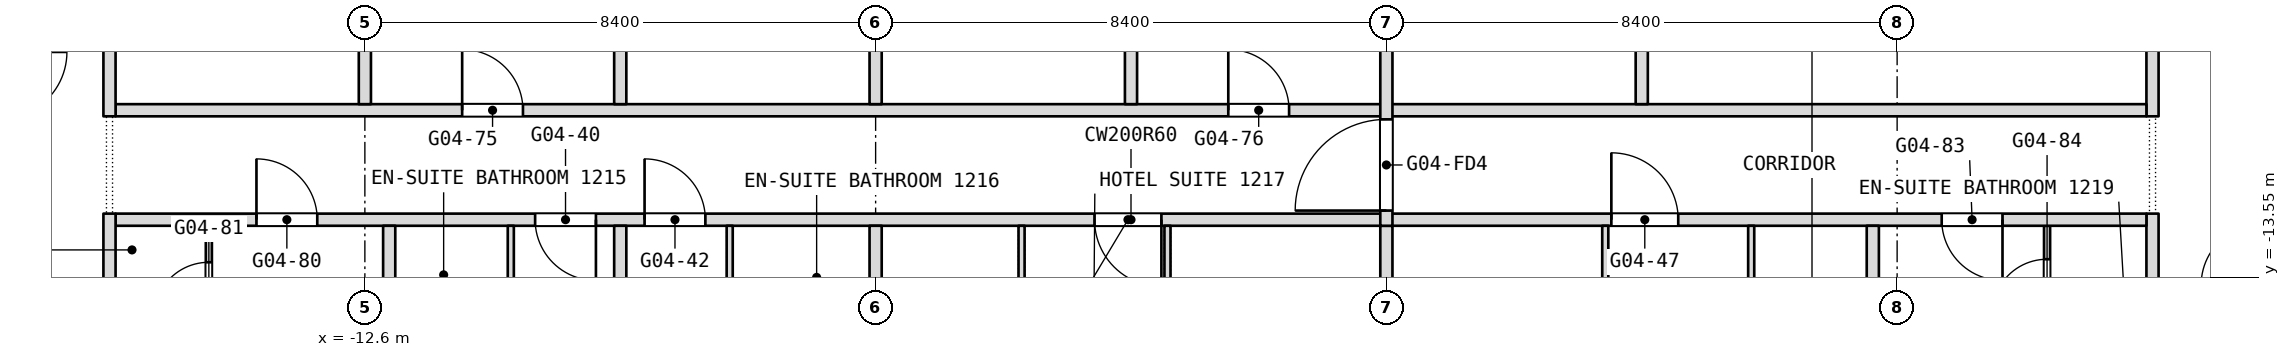
"""IFC4 building model, lengths in metres.
Left out: names, types, materials, properties, quantities, classifications, styles, units other than length and angle.
Written with IfcOpenShell. Run it as: python <this file> out.ifc"""

import sys

from ifc_helpers import new_model, si_unit, direction, frame, frame_2d, origin, place, context, subcontext, project, spatial, rectangle, extrude, element, fill, save


model = new_model("IFC4")
c1 = context("Model", 3, precision=1e-05, world=origin(), true_north=direction((0.0, 1.0)))
c2 = subcontext(c1, "Body", "Model", "MODEL_VIEW")
j1 = project(units=[si_unit("LENGTHUNIT", "METRE"), si_unit("PLANEANGLEUNIT", "RADIAN")], contexts=[c1])
p1 = place(None, origin())
s1 = spatial("IfcSite", under=j1, at=p1, CompositionType="ELEMENT")
p2 = place(p1, origin())
s2 = spatial("IfcBuilding", under=s1, at=p2, CompositionType="ELEMENT")
p3 = place(p2, frame((0.0, 0.0, 58.1)))
s3 = spatial("IfcBuildingStorey", under=s2, at=p3, CompositionType="ELEMENT", Elevation=58.1)
p4 = place(p3, frame((16.8, -17.143, 0.0), z_axis=(0.0, 0.0, 1.0), x_axis=(0.0, 1.0, 0.0)))
e1 = element("IfcWall", 1, at=p4, inside=s3, PredefinedType="PARTITIONING", context=c2, shape_type="SweptSolid", body=[
    extrude(rectangle(XDim=4.643, YDim=0.2, at=frame_2d((2.322, 0.0))), origin(), (0.0, 0.0, 1.0), 3.34),
])
p5 = place(p4, frame((0.771, 0.0, 0.0)))
e2 = element("IfcOpeningElement", 2, at=p5, cuts=e1, PredefinedType="OPENING", context=c2, shape_type="SweptSolid", body=[
    extrude(rectangle(XDim=0.9, YDim=2.1, at=frame_2d((0.45, 1.05))), frame((0.0, 0.1, 0.0), z_axis=(0.0, -1.0, 0.0), x_axis=(1.0, 0.0, 0.0)), (0.0, 0.0, 1.0), 0.2),
])
p6 = place(p3, frame((16.8, -10.9, 0.0), z_axis=(0.0, 0.0, 1.0), x_axis=(0.0, 1.0, 0.0)))
e3 = element("IfcWall", 3, at=p6, inside=s3, PredefinedType="PARTITIONING", context=c2, shape_type="SweptSolid", body=[
    extrude(rectangle(XDim=7.3, YDim=0.2, at=frame_2d((3.65, 0.0))), origin(), (0.0, 0.0, 1.0), 3.34),
])
p7 = place(p6, frame((3.15, 0.0, 0.0)))
e4 = element("IfcOpeningElement", 4, at=p7, cuts=e3, PredefinedType="OPENING", context=c2, shape_type="SweptSolid", body=[
    extrude(rectangle(XDim=1.0, YDim=2.1, at=frame_2d((0.5, 1.05))), frame((0.0, 0.1, 0.0), z_axis=(0.0, -1.0, 0.0), x_axis=(1.0, 0.0, 0.0)), (0.0, 0.0, 1.0), 0.2),
])
p8 = place(p3, frame((15.066, -14.9, 0.0), z_axis=(0.0, 0.0, 1.0), x_axis=(0.0, 1.0, 0.0)))
e5 = element("IfcWall", 5, at=p8, inside=s3, PredefinedType="PARTITIONING", context=c2, shape_type="SweptSolid", body=[
    extrude(rectangle(XDim=2.2, YDim=0.1, at=frame_2d((1.1, 0.0))), origin(), (0.0, 0.0, 1.0), 3.34),
])
p9 = place(p8, frame((0.75, 0.0, 0.0)))
e6 = element("IfcOpeningElement", 6, at=p9, cuts=e5, PredefinedType="OPENING", context=c2, shape_type="SweptSolid", body=[
    extrude(rectangle(XDim=0.9, YDim=2.1, at=frame_2d((0.45, 1.05))), frame((0.0, 0.05, 0.0), z_axis=(0.0, -1.0, 0.0), x_axis=(1.0, 0.0, 0.0)), (0.0, 0.0, 1.0), 0.1),
])
p10 = place(p3, frame((-16.7, -12.6, 0.0), z_axis=(0.0, 0.0, 1.0), x_axis=(1.0, 0.0, 0.0)))
e7 = element("IfcWall", 7, at=p10, inside=s3, PredefinedType="PARTITIONING", context=c2, shape_type="SweptSolid", body=[
    extrude(rectangle(XDim=33.4, YDim=0.2, at=frame_2d((16.7, 0.0))), origin(), (0.0, 0.0, 1.0), 3.34),
])
p11 = place(p10, frame((6.9, 0.0, 0.0)))
e8 = element("IfcOpeningElement", 8, at=p11, cuts=e7, PredefinedType="OPENING", context=c2, shape_type="SweptSolid", body=[
    extrude(rectangle(XDim=1.0, YDim=2.1, at=frame_2d((0.5, 1.05))), frame((0.0, 0.1, 0.0), z_axis=(0.0, -1.0, 0.0), x_axis=(1.0, 0.0, 0.0)), (0.0, 0.0, 1.0), 0.2),
])
p12 = place(p10, frame((8.7, 0.0, 0.0)))
e9 = element("IfcOpeningElement", 9, at=p12, cuts=e7, PredefinedType="OPENING", context=c2, shape_type="SweptSolid", body=[
    extrude(rectangle(XDim=1.0, YDim=2.1, at=frame_2d((0.5, 1.05))), frame((0.0, 0.1, 0.0), z_axis=(0.0, -1.0, 0.0), x_axis=(1.0, 0.0, 0.0)), (0.0, 0.0, 1.0), 0.2),
])
p13 = place(p10, frame((16.1, 0.0, 0.0)))
e10 = element("IfcOpeningElement", 10, at=p13, cuts=e7, PredefinedType="OPENING", context=c2, shape_type="SweptSolid", body=[
    extrude(rectangle(XDim=1.1, YDim=2.1, at=frame_2d((0.55, 1.05))), frame((0.0, 0.1, 0.0), z_axis=(0.0, -1.0, 0.0), x_axis=(1.0, 0.0, 0.0)), (0.0, 0.0, 1.0), 0.2),
])
p14 = place(p10, frame((24.6, 0.0, 0.0)))
e11 = element("IfcOpeningElement", 11, at=p14, cuts=e7, PredefinedType="OPENING", context=c2, shape_type="SweptSolid", body=[
    extrude(rectangle(XDim=1.1, YDim=2.1, at=frame_2d((0.55, 1.05))), frame((0.0, 0.1, 0.0), z_axis=(0.0, -1.0, 0.0), x_axis=(1.0, 0.0, 0.0)), (0.0, 0.0, 1.0), 0.2),
])
p15 = place(p10, frame((2.317, 0.0, 0.0)))
e12 = element("IfcOpeningElement", 12, at=p15, cuts=e7, PredefinedType="OPENING", context=c2, shape_type="SweptSolid", body=[
    extrude(rectangle(XDim=1.0, YDim=2.1, at=frame_2d((0.5, 1.05))), frame((0.0, 0.1, 0.0), z_axis=(0.0, -1.0, 0.0), x_axis=(1.0, 0.0, 0.0)), (0.0, 0.0, 1.0), 0.2),
])
p16 = place(p10, frame((30.033, 0.0, 0.0)))
e13 = element("IfcOpeningElement", 13, at=p16, cuts=e7, PredefinedType="OPENING", context=c2, shape_type="SweptSolid", body=[
    extrude(rectangle(XDim=1.0, YDim=2.1, at=frame_2d((0.5, 1.05))), frame((0.0, 0.1, 0.0), z_axis=(0.0, -1.0, 0.0), x_axis=(1.0, 0.0, 0.0)), (0.0, 0.0, 1.0), 0.2),
])
p17 = place(p3, frame((12.2, -15.8, 0.0), z_axis=(0.0, 0.0, 1.0), x_axis=(0.0, 1.0, 0.0)))
e14 = element("IfcWall", 14, at=p17, inside=s3, PredefinedType="PARTITIONING", context=c2, shape_type="SweptSolid", body=[
    extrude(rectangle(XDim=3.1, YDim=0.2, at=frame_2d((1.55, 0.0))), origin(), (0.0, 0.0, 1.0), 3.34),
])
p18 = place(p3, frame((-16.7, -10.8, 0.0), z_axis=(0.0, 0.0, 1.0), x_axis=(1.0, 0.0, 0.0)))
e15 = element("IfcWall", 15, at=p18, inside=s3, PredefinedType="PARTITIONING", context=c2, shape_type="SweptSolid", body=[
    extrude(rectangle(XDim=33.4, YDim=0.2, at=frame_2d((16.7, 0.0))), origin(), (0.0, 0.0, 1.0), 3.34),
])
p19 = place(p18, frame((5.7, 0.0, 0.0)))
e16 = element("IfcOpeningElement", 16, at=p19, cuts=e15, PredefinedType="OPENING", context=c2, shape_type="SweptSolid", body=[
    extrude(rectangle(XDim=1.0, YDim=2.1, at=frame_2d((0.5, 1.05))), frame((0.0, 0.1, 0.0), z_axis=(0.0, -1.0, 0.0), x_axis=(1.0, 0.0, 0.0)), (0.0, 0.0, 1.0), 0.2),
])
p20 = place(p18, frame((18.3, 0.0, 0.0)))
e17 = element("IfcOpeningElement", 17, at=p20, cuts=e15, PredefinedType="OPENING", context=c2, shape_type="SweptSolid", body=[
    extrude(rectangle(XDim=1.0, YDim=2.1, at=frame_2d((0.5, 1.05))), frame((0.0, 0.1, 0.0), z_axis=(0.0, -1.0, 0.0), x_axis=(1.0, 0.0, 0.0)), (0.0, 0.0, 1.0), 0.2),
])
p21 = place(p3, frame((10.2, -16.25, 0.0), z_axis=(0.0, 0.0, 1.0), x_axis=(0.0, 1.0, 0.0)))
e18 = element("IfcWall", 18, at=p21, inside=s3, PredefinedType="PARTITIONING", context=c2, shape_type="SweptSolid", body=[
    extrude(rectangle(XDim=3.55, YDim=0.1, at=frame_2d((1.775, 0.0))), origin(), (0.0, 0.0, 1.0), 3.34),
])
p22 = place(p3, frame((8.4, -10.7, 0.0), z_axis=(0.0, 0.0, 1.0), x_axis=(0.0, 1.0, 0.0)))
e19 = element("IfcWall", 19, at=p22, inside=s3, PredefinedType="PARTITIONING", context=c2, shape_type="SweptSolid", body=[
    extrude(rectangle(XDim=3.6, YDim=0.2, at=frame_2d((1.8, 0.0))), origin(), (0.0, 0.0, 1.0), 3.34),
])
p23 = place(p3, frame((7.8, -16.15, 0.0), z_axis=(0.0, 0.0, 1.0), x_axis=(0.0, 1.0, 0.0)))
e20 = element("IfcWall", 20, at=p23, inside=s3, PredefinedType="PARTITIONING", context=c2, shape_type="SweptSolid", body=[
    extrude(rectangle(XDim=3.45, YDim=0.1, at=frame_2d((1.725, 0.0))), origin(), (0.0, 0.0, 1.0), 3.34),
])
p24 = place(p3, frame((4.2, -17.7, 0.0), z_axis=(0.0, 0.0, 1.0), x_axis=(0.0, 1.0, 0.0)))
e21 = element("IfcWall", 21, at=p24, inside=s3, PredefinedType="PARTITIONING", context=c2, shape_type="SweptSolid", body=[
    extrude(rectangle(XDim=5.0, YDim=0.2, at=frame_2d((2.5, 0.0))), origin(), (0.0, 0.0, 1.0), 3.34),
])
p25 = place(p3, frame((4.2, -12.7, 0.0), z_axis=(0.0, 0.0, 1.0), x_axis=(0.0, 1.0, 0.0)))
e22 = element("IfcWall", 22, at=p25, inside=s3, PredefinedType="PARTITIONING", context=c2, shape_type="SweptSolid", body=[
    extrude(rectangle(XDim=12.7, YDim=0.2, at=frame_2d((6.35, 0.0))), origin(), (0.0, 0.0, 1.0), 3.34),
])
p26 = place(p25, frame((11.05, 0.0, 0.0)))
e23 = element("IfcOpeningElement", 23, at=p26, cuts=e22, PredefinedType="OPENING", context=c2, shape_type="SweptSolid", body=[
    extrude(rectangle(XDim=1.5, YDim=2.1, at=frame_2d((0.75, 1.05))), frame((0.0, 0.1, 0.0), z_axis=(0.0, -1.0, 0.0), x_axis=(1.0, 0.0, 0.0)), (0.0, 0.0, 1.0), 0.2),
])
p27 = place(p25, frame((0.25, 0.0, 0.0)))
e24 = element("IfcOpeningElement", 24, at=p27, cuts=e22, PredefinedType="OPENING", context=c2, shape_type="SweptSolid", body=[
    extrude(rectangle(XDim=1.5, YDim=2.1, at=frame_2d((0.75, 1.05))), frame((0.0, 0.1, 0.0), z_axis=(0.0, -1.0, 0.0), x_axis=(1.0, 0.0, 0.0)), (0.0, 0.0, 1.0), 0.2),
])
p28 = place(p3, frame((0.6, -16.25, 0.0), z_axis=(0.0, 0.0, 1.0), x_axis=(0.0, 1.0, 0.0)))
e25 = element("IfcWall", 25, at=p28, inside=s3, PredefinedType="PARTITIONING", context=c2, shape_type="SweptSolid", body=[
    extrude(rectangle(XDim=3.55, YDim=0.1, at=frame_2d((1.775, 0.0))), origin(), (0.0, 0.0, 1.0), 3.34),
])
p29 = place(p3, frame((0.0, -10.7, 0.0), z_axis=(0.0, 0.0, 1.0), x_axis=(0.0, 1.0, 0.0)))
e26 = element("IfcWall", 26, at=p29, inside=s3, PredefinedType="PARTITIONING", context=c2, shape_type="SweptSolid", body=[
    extrude(rectangle(XDim=8.8, YDim=0.2, at=frame_2d((4.4, 0.0))), origin(), (0.0, 0.0, 1.0), 3.34),
])
p30 = place(p3, frame((-1.8, -16.15, 0.0), z_axis=(0.0, 0.0, 1.0), x_axis=(0.0, 1.0, 0.0)))
e27 = element("IfcWall", 27, at=p30, inside=s3, PredefinedType="PARTITIONING", context=c2, shape_type="SweptSolid", body=[
    extrude(rectangle(XDim=3.45, YDim=0.1, at=frame_2d((1.725, 0.0))), origin(), (0.0, 0.0, 1.0), 3.34),
])
p31 = place(p3, frame((-4.2, -17.7, 0.0), z_axis=(0.0, 0.0, 1.0), x_axis=(0.0, 1.0, 0.0)))
e28 = element("IfcWall", 28, at=p31, inside=s3, PredefinedType="PARTITIONING", context=c2, shape_type="SweptSolid", body=[
    extrude(rectangle(XDim=5.0, YDim=0.2, at=frame_2d((2.5, 0.0))), origin(), (0.0, 0.0, 1.0), 3.34),
])
p32 = place(p3, frame((-4.2, -10.7, 0.0), z_axis=(0.0, 0.0, 1.0), x_axis=(0.0, 1.0, 0.0)))
e29 = element("IfcWall", 29, at=p32, inside=s3, PredefinedType="PARTITIONING", context=c2, shape_type="SweptSolid", body=[
    extrude(rectangle(XDim=8.8, YDim=0.2, at=frame_2d((4.4, 0.0))), origin(), (0.0, 0.0, 1.0), 3.34),
])
p33 = place(p3, frame((-6.6, -15.425, 0.0), z_axis=(0.0, 0.0, 1.0), x_axis=(0.0, 1.0, 0.0)))
e30 = element("IfcWall", 30, at=p33, inside=s3, PredefinedType="PARTITIONING", context=c2, shape_type="SweptSolid", body=[
    extrude(rectangle(XDim=2.725, YDim=0.1, at=frame_2d((1.363, 0.0))), origin(), (0.0, 0.0, 1.0), 3.34),
])
p34 = place(p3, frame((-8.4, -17.7, 0.0), z_axis=(0.0, 0.0, 1.0), x_axis=(0.0, 1.0, 0.0)))
e31 = element("IfcWall", 31, at=p34, inside=s3, PredefinedType="PARTITIONING", context=c2, shape_type="SweptSolid", body=[
    extrude(rectangle(XDim=5.0, YDim=0.2, at=frame_2d((2.5, 0.0))), origin(), (0.0, 0.0, 1.0), 3.34),
])
p35 = place(p3, frame((-8.4, -10.7, 0.0), z_axis=(0.0, 0.0, 1.0), x_axis=(0.0, 1.0, 0.0)))
e32 = element("IfcWall", 32, at=p35, inside=s3, PredefinedType="PARTITIONING", context=c2, shape_type="SweptSolid", body=[
    extrude(rectangle(XDim=5.4, YDim=0.2, at=frame_2d((2.7, 0.0))), origin(), (0.0, 0.0, 1.0), 3.34),
])
p36 = place(p3, frame((-10.2, -15.325, 0.0), z_axis=(0.0, 0.0, 1.0), x_axis=(0.0, 1.0, 0.0)))
e33 = element("IfcWall", 33, at=p36, inside=s3, PredefinedType="PARTITIONING", context=c2, shape_type="SweptSolid", body=[
    extrude(rectangle(XDim=2.625, YDim=0.1, at=frame_2d((1.312, 0.0))), origin(), (0.0, 0.0, 1.0), 3.34),
])
p37 = place(p3, frame((-12.2, -15.275, 0.0), z_axis=(0.0, 0.0, 1.0), x_axis=(0.0, 1.0, 0.0)))
e34 = element("IfcWall", 34, at=p37, inside=s3, PredefinedType="PARTITIONING", context=c2, shape_type="SweptSolid", body=[
    extrude(rectangle(XDim=2.575, YDim=0.2, at=frame_2d((1.288, 0.0))), origin(), (0.0, 0.0, 1.0), 3.34),
])
p38 = place(p3, frame((-12.6, -10.7, 0.0), z_axis=(0.0, 0.0, 1.0), x_axis=(0.0, 1.0, 0.0)))
e35 = element("IfcWall", 35, at=p38, inside=s3, PredefinedType="PARTITIONING", context=c2, shape_type="SweptSolid", body=[
    extrude(rectangle(XDim=5.4, YDim=0.2, at=frame_2d((2.7, 0.0))), origin(), (0.0, 0.0, 1.0), 3.34),
])
p39 = place(p3, frame((-15.166, -15.0, 0.0), z_axis=(0.0, 0.0, 1.0), x_axis=(0.0, 1.0, 0.0)))
e36 = element("IfcWall", 36, at=p39, inside=s3, PredefinedType="PARTITIONING", context=c2, shape_type="SweptSolid", body=[
    extrude(rectangle(XDim=2.3, YDim=0.1, at=frame_2d((1.15, 0.0))), origin(), (0.0, 0.0, 1.0), 3.34),
])
p40 = place(p39, frame((0.8, 0.0, 0.0)))
e37 = element("IfcOpeningElement", 37, at=p40, cuts=e36, PredefinedType="OPENING", context=c2, shape_type="SweptSolid", body=[
    extrude(rectangle(XDim=0.9, YDim=2.1, at=frame_2d((0.45, 1.05))), frame((0.0, 0.05, 0.0), z_axis=(0.0, -1.0, 0.0), x_axis=(1.0, 0.0, 0.0)), (0.0, 0.0, 1.0), 0.1),
])
p41 = place(p3, frame((-16.8, -17.143, 0.0), z_axis=(0.0, 0.0, 1.0), x_axis=(0.0, 1.0, 0.0)))
e38 = element("IfcWall", 38, at=p41, inside=s3, PredefinedType="PARTITIONING", context=c2, shape_type="SweptSolid", body=[
    extrude(rectangle(XDim=4.643, YDim=0.2, at=frame_2d((2.322, 0.0))), origin(), (0.0, 0.0, 1.0), 3.34),
])
p42 = place(p41, frame((0.772, 0.0, 0.0)))
e39 = element("IfcOpeningElement", 39, at=p42, cuts=e38, PredefinedType="OPENING", context=c2, shape_type="SweptSolid", body=[
    extrude(rectangle(XDim=0.9, YDim=2.1, at=frame_2d((0.45, 1.05))), frame((0.0, 0.1, 0.0), z_axis=(0.0, -1.0, 0.0), x_axis=(1.0, 0.0, 0.0)), (0.0, 0.0, 1.0), 0.2),
])
p43 = place(p3, frame((-16.8, -10.9, 0.0), z_axis=(0.0, 0.0, 1.0), x_axis=(0.0, 1.0, 0.0)))
e40 = element("IfcWall", 40, at=p43, inside=s3, PredefinedType="PARTITIONING", context=c2, shape_type="SweptSolid", body=[
    extrude(rectangle(XDim=9.0, YDim=0.2, at=frame_2d((4.5, 0.0))), origin(), (0.0, 0.0, 1.0), 3.34),
])
p44 = place(p9, origin())
e41 = element("IfcDoor", 41, at=p44, inside=s3, OperationType="SINGLE_SWING_RIGHT", PredefinedType="DOOR", context=c2, shape_type="SweptSolid", body=[
    extrude(rectangle(XDim=0.9, YDim=2.1, at=frame_2d((0.45, 1.05))), frame((0.0, 0.025, 0.0), z_axis=(0.0, -1.0, 0.0), x_axis=(1.0, 0.0, 0.0)), (0.0, 0.0, 1.0), 0.05),
])
fill(e6, e41)
p45 = place(p11, origin())
e42 = element("IfcDoor", 42, at=p45, inside=s3, OperationType="SINGLE_SWING_RIGHT", PredefinedType="DOOR", context=c2, shape_type="SweptSolid", body=[
    extrude(rectangle(XDim=1.0, YDim=2.1, at=frame_2d((0.5, 1.05))), frame((0.0, 0.025, 0.0), z_axis=(0.0, -1.0, 0.0), x_axis=(1.0, 0.0, 0.0)), (0.0, 0.0, 1.0), 0.05),
])
fill(e8, e42)
p46 = place(p12, origin())
e43 = element("IfcDoor", 43, at=p46, inside=s3, OperationType="SINGLE_SWING_RIGHT", PredefinedType="DOOR", context=c2, shape_type="SweptSolid", body=[
    extrude(rectangle(XDim=1.0, YDim=2.1, at=frame_2d((0.5, 1.05))), frame((0.0, 0.025, 0.0), z_axis=(0.0, -1.0, 0.0), x_axis=(1.0, 0.0, 0.0)), (0.0, 0.0, 1.0), 0.05),
])
fill(e9, e43)
p47 = place(p13, origin())
e44 = element("IfcDoor", 44, at=p47, inside=s3, OperationType="SINGLE_SWING_LEFT", PredefinedType="DOOR", context=c2, shape_type="SweptSolid", body=[
    extrude(rectangle(XDim=1.1, YDim=2.1, at=frame_2d((0.55, 1.05))), frame((0.0, 0.025, 0.0), z_axis=(0.0, -1.0, 0.0), x_axis=(1.0, 0.0, 0.0)), (0.0, 0.0, 1.0), 0.05),
])
fill(e10, e44)
p48 = place(p14, origin())
e45 = element("IfcDoor", 45, at=p48, inside=s3, OperationType="SINGLE_SWING_RIGHT", PredefinedType="DOOR", context=c2, shape_type="SweptSolid", body=[
    extrude(rectangle(XDim=1.1, YDim=2.1, at=frame_2d((0.55, 1.05))), frame((0.0, 0.025, 0.0), z_axis=(0.0, -1.0, 0.0), x_axis=(1.0, 0.0, 0.0)), (0.0, 0.0, 1.0), 0.05),
])
fill(e11, e45)
p49 = place(p15, origin())
e46 = element("IfcDoor", 46, at=p49, inside=s3, OperationType="SINGLE_SWING_RIGHT", PredefinedType="DOOR", context=c2, shape_type="SweptSolid", body=[
    extrude(rectangle(XDim=1.0, YDim=2.1, at=frame_2d((0.5, 1.05))), frame((0.0, 0.025, 0.0), z_axis=(0.0, -1.0, 0.0), x_axis=(1.0, 0.0, 0.0)), (0.0, 0.0, 1.0), 0.05),
])
fill(e12, e46)
p50 = place(p16, origin())
e47 = element("IfcDoor", 47, at=p50, inside=s3, OperationType="SINGLE_SWING_LEFT", PredefinedType="DOOR", context=c2, shape_type="SweptSolid", body=[
    extrude(rectangle(XDim=1.0, YDim=2.1, at=frame_2d((0.5, 1.05))), frame((0.0, 0.025, 0.0), z_axis=(0.0, -1.0, 0.0), x_axis=(1.0, 0.0, 0.0)), (0.0, 0.0, 1.0), 0.05),
])
fill(e13, e47)
p51 = place(p19, origin())
e48 = element("IfcDoor", 48, at=p51, inside=s3, OperationType="SINGLE_SWING_LEFT", PredefinedType="DOOR", context=c2, shape_type="SweptSolid", body=[
    extrude(rectangle(XDim=1.0, YDim=2.1, at=frame_2d((0.5, 1.05))), frame((0.0, 0.025, 0.0), z_axis=(0.0, -1.0, 0.0), x_axis=(1.0, 0.0, 0.0)), (0.0, 0.0, 1.0), 0.05),
])
fill(e16, e48)
p52 = place(p20, origin())
e49 = element("IfcDoor", 49, at=p52, inside=s3, OperationType="SINGLE_SWING_RIGHT", PredefinedType="DOOR", context=c2, shape_type="SweptSolid", body=[
    extrude(rectangle(XDim=1.0, YDim=2.1, at=frame_2d((0.5, 1.05))), frame((0.0, 0.025, 0.0), z_axis=(0.0, -1.0, 0.0), x_axis=(1.0, 0.0, 0.0)), (0.0, 0.0, 1.0), 0.05),
])
fill(e17, e49)
p53 = place(p40, origin())
e50 = element("IfcDoor", 50, at=p53, inside=s3, OperationType="SINGLE_SWING_RIGHT", PredefinedType="DOOR", context=c2, shape_type="SweptSolid", body=[
    extrude(rectangle(XDim=0.9, YDim=2.1, at=frame_2d((0.45, 1.05))), frame((0.0, 0.025, 0.0), z_axis=(0.0, -1.0, 0.0), x_axis=(1.0, 0.0, 0.0)), (0.0, 0.0, 1.0), 0.05),
])
fill(e37, e50)
p54 = place(p27, origin())
e51 = element("IfcDoor", 51, at=p54, inside=s3, OperationType="DOUBLE_DOOR_DOUBLE_SWING", PredefinedType="DOOR", context=c2, shape_type="SweptSolid", body=[
    extrude(rectangle(XDim=1.5, YDim=2.1, at=frame_2d((0.75, 1.05))), frame((0.0, 0.025, 0.0), z_axis=(0.0, -1.0, 0.0), x_axis=(1.0, 0.0, 0.0)), (0.0, 0.0, 1.0), 0.05),
])
fill(e24, e51)
save(model, sys.argv[1])
